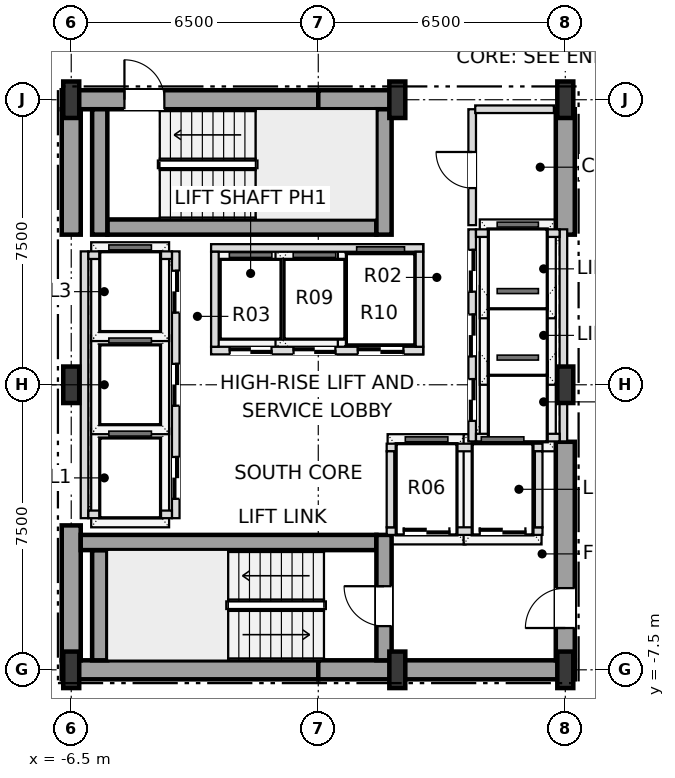
"""IFC4 building model, lengths in metres.
Left out: names, types, materials, properties, quantities, classifications, styles, units other than length and angle.
Written with IfcOpenShell. Run it as: python <this file> out.ifc"""

import sys

from ifc_helpers import new_model, si_unit, direction, frame, frame_2d, origin, origin_2d, place, context, subcontext, project, spatial, rectangle, i_section, extrude, element, fill, save


model = new_model("IFC4")
c1 = context("Model", 3, precision=1e-05, world=origin(), true_north=direction((0.0, 1.0)))
c2 = subcontext(c1, "Body", "Model", "MODEL_VIEW")
j1 = project(units=[si_unit("LENGTHUNIT", "METRE"), si_unit("PLANEANGLEUNIT", "RADIAN")], contexts=[c1])
p1 = place(None, origin())
s1 = spatial("IfcSite", under=j1, at=p1, CompositionType="ELEMENT")
p2 = place(p1, origin())
s2 = spatial("IfcBuilding", under=s1, at=p2, CompositionType="ELEMENT")
p3 = place(p2, frame((0.0, 0.0, -3.6)))
s3 = spatial("IfcBuildingStorey", under=s2, at=p3, CompositionType="ELEMENT", Elevation=-3.6)
for number, where, z_axis, x_axis in (
    (1, (-6.5, -7.5, 0.0), (0.0, 0.0, 1.0), (1.0, 0.0, 0.0)),
    (2, (2.08, -7.5, 0.0), (0.0, 0.0, 1.0), (1.0, 0.0, 0.0)),
    (3, (6.5, -7.5, 0.0), (0.0, 0.0, 1.0), (1.0, 0.0, 0.0)),
    (4, (-6.5, 0.0, 0.0), (0.0, 0.0, 1.0), (1.0, 0.0, 0.0)),
    (5, (6.5, 0.0, 0.0), (0.0, 0.0, 1.0), (1.0, 0.0, 0.0)),
    (6, (-6.5, 7.5, 0.0), (0.0, 0.0, 1.0), (1.0, 0.0, 0.0)),
    (7, (2.08, 7.5, 0.0), (0.0, 0.0, 1.0), (1.0, 0.0, 0.0)),
    (8, (6.5, 7.5, 0.0), (0.0, 0.0, 1.0), (1.0, 0.0, 0.0)),
):
    element("IfcColumn", number, at=place(p3, frame(where, z_axis=z_axis, x_axis=x_axis)), inside=s3, PredefinedType="COLUMN", context=c2, shape_type="SweptSolid", body=[
        extrude(i_section(OverallWidth=0.42, OverallDepth=0.96, WebThickness=0.022, FlangeThickness=0.034, at=origin_2d()), origin(), (0.0, 0.0, 1.0), 3.6),
    ])
for number, where, z_axis, x_axis in (
    (9, (-6.75, -7.5, 0.0), (0.0, 0.0, 1.0), (1.0, 0.0, 0.0)),
    (10, (0.0, -7.5, 0.0), (0.0, 0.0, 1.0), (1.0, 0.0, 0.0)),
):
    element("IfcWall", number, at=place(p3, frame(where, z_axis=z_axis, x_axis=x_axis)), inside=s3, PredefinedType="SHEAR", context=c2, shape_type="SweptSolid", body=[
        extrude(rectangle(XDim=6.75, YDim=0.5, at=frame_2d((3.375, 0.0))), origin(), (0.0, 0.0, 1.0), 3.25),
    ])
p4 = place(p3, frame((-6.75, 7.5, 0.0), z_axis=(0.0, 0.0, 1.0), x_axis=(1.0, 0.0, 0.0)))
e11 = element("IfcWall", 11, at=p4, inside=s3, PredefinedType="SHEAR", context=c2, shape_type="SweptSolid", body=[
    extrude(rectangle(XDim=6.75, YDim=0.5, at=frame_2d((3.375, 0.0))), origin(), (0.0, 0.0, 1.0), 3.25),
])
p5 = place(p4, frame((1.65, 0.0, 0.0)))
e12 = element("IfcOpeningElement", 12, at=p5, cuts=e11, PredefinedType="OPENING", context=c2, shape_type="SweptSolid", body=[
    extrude(rectangle(XDim=1.05, YDim=2.15, at=frame_2d((0.525, 1.075))), frame((0.0, 0.26, 0.0), z_axis=(0.0, -1.0, 0.0), x_axis=(1.0, 0.0, 0.0)), (0.0, 0.0, 1.0), 0.52),
])
p6 = place(p3, frame((0.0, 7.5, 0.0), z_axis=(0.0, 0.0, 1.0), x_axis=(1.0, 0.0, 0.0)))
e13 = element("IfcWall", 13, at=p6, inside=s3, PredefinedType="SHEAR", context=c2, shape_type="SweptSolid", body=[
    extrude(rectangle(XDim=2.08, YDim=0.5, at=frame_2d((1.04, 0.0))), origin(), (0.0, 0.0, 1.0), 3.25),
])
p7 = place(p3, frame((-6.5, -7.25, 0.0), z_axis=(0.0, 0.0, 1.0), x_axis=(0.0, 1.0, 0.0)))
e14 = element("IfcWall", 14, at=p7, inside=s3, PredefinedType="SHEAR", context=c2, shape_type="SweptSolid", body=[
    extrude(rectangle(XDim=3.55, YDim=0.5, at=frame_2d((1.775, 0.0))), origin(), (0.0, 0.0, 1.0), 3.25),
])
p8 = place(p3, frame((-6.5, 3.95, 0.0), z_axis=(0.0, 0.0, 1.0), x_axis=(0.0, 1.0, 0.0)))
e15 = element("IfcWall", 15, at=p8, inside=s3, PredefinedType="SHEAR", context=c2, shape_type="SweptSolid", body=[
    extrude(rectangle(XDim=3.3, YDim=0.5, at=frame_2d((1.65, 0.0))), origin(), (0.0, 0.0, 1.0), 3.25),
])
p9 = place(p3, frame((6.5, -7.25, 0.0), z_axis=(0.0, 0.0, 1.0), x_axis=(0.0, 1.0, 0.0)))
e16 = element("IfcWall", 16, at=p9, inside=s3, PredefinedType="SHEAR", context=c2, shape_type="SweptSolid", body=[
    extrude(rectangle(XDim=5.75, YDim=0.5, at=frame_2d((2.875, 0.0))), origin(), (0.0, 0.0, 1.0), 3.25),
])
p10 = place(p9, frame((0.85, 0.0, 0.0)))
e17 = element("IfcOpeningElement", 17, at=p10, cuts=e16, PredefinedType="OPENING", context=c2, shape_type="SweptSolid", body=[
    extrude(rectangle(XDim=1.05, YDim=2.15, at=frame_2d((0.525, 1.075))), frame((0.0, 0.26, 0.0), z_axis=(0.0, -1.0, 0.0), x_axis=(1.0, 0.0, 0.0)), (0.0, 0.0, 1.0), 0.52),
])
p11 = place(p3, frame((6.5, 3.95, 0.0), z_axis=(0.0, 0.0, 1.0), x_axis=(0.0, 1.0, 0.0)))
e18 = element("IfcWall", 18, at=p11, inside=s3, PredefinedType="SHEAR", context=c2, shape_type="SweptSolid", body=[
    extrude(rectangle(XDim=3.3, YDim=0.5, at=frame_2d((1.65, 0.0))), origin(), (0.0, 0.0, 1.0), 3.25),
])
p12 = place(p3, frame((-5.75, -7.25, 0.0), z_axis=(0.0, 0.0, 1.0), x_axis=(0.0, 1.0, 0.0)))
e19 = element("IfcWall", 19, at=p12, inside=s3, PredefinedType="SHEAR", context=c2, shape_type="SweptSolid", body=[
    extrude(rectangle(XDim=2.9, YDim=0.4, at=frame_2d((1.45, 0.0))), origin(), (0.0, 0.0, 1.0), 3.25),
])
p13 = place(p3, frame((-6.25, -4.15, 0.0), z_axis=(0.0, 0.0, 1.0), x_axis=(1.0, 0.0, 0.0)))
e20 = element("IfcWall", 20, at=p13, inside=s3, PredefinedType="SHEAR", context=c2, shape_type="SweptSolid", body=[
    extrude(rectangle(XDim=7.78, YDim=0.4, at=frame_2d((3.89, 0.0))), origin(), (0.0, 0.0, 1.0), 3.25),
])
p14 = place(p3, frame((1.73, -7.25, 0.0), z_axis=(0.0, 0.0, 1.0), x_axis=(0.0, 1.0, 0.0)))
e21 = element("IfcWall", 21, at=p14, inside=s3, PredefinedType="SHEAR", context=c2, shape_type="SweptSolid", body=[
    extrude(rectangle(XDim=3.3, YDim=0.4, at=frame_2d((1.65, 0.0))), origin(), (0.0, 0.0, 1.0), 3.25),
])
p15 = place(p14, frame((0.9, 0.0, 0.0)))
e22 = element("IfcOpeningElement", 22, at=p15, cuts=e21, PredefinedType="OPENING", context=c2, shape_type="SweptSolid", body=[
    extrude(rectangle(XDim=1.05, YDim=2.15, at=frame_2d((0.525, 1.075))), frame((0.0, 0.21, 0.0), z_axis=(0.0, -1.0, 0.0), x_axis=(1.0, 0.0, 0.0)), (0.0, 0.0, 1.0), 0.42),
])
p16 = place(p3, frame((-5.55, 4.15, 0.0), z_axis=(0.0, 0.0, 1.0), x_axis=(1.0, 0.0, 0.0)))
e23 = element("IfcWall", 23, at=p16, inside=s3, PredefinedType="SHEAR", context=c2, shape_type="SweptSolid", body=[
    extrude(rectangle(XDim=7.08, YDim=0.4, at=frame_2d((3.54, 0.0))), origin(), (0.0, 0.0, 1.0), 3.25),
])
for number, where, z_axis, x_axis in (
    (24, (1.73, 3.95, 0.0), (0.0, 0.0, 1.0), (0.0, 1.0, 0.0)),
    (25, (-5.75, 3.95, 0.0), (0.0, 0.0, 1.0), (0.0, 1.0, 0.0)),
):
    element("IfcWall", number, at=place(p3, frame(where, z_axis=z_axis, x_axis=x_axis)), inside=s3, PredefinedType="SHEAR", context=c2, shape_type="SweptSolid", body=[
        extrude(rectangle(XDim=3.3, YDim=0.4, at=frame_2d((1.65, 0.0))), origin(), (0.0, 0.0, 1.0), 3.25),
    ])
p17 = place(p3, frame((-3.75, -3.51, 0.0), z_axis=(0.0, 0.0, 1.0), x_axis=(0.0, 1.0, 0.0)))
e26 = element("IfcWall", 26, at=p17, inside=s3, PredefinedType="SOLIDWALL", context=c2, shape_type="SweptSolid", body=[
    extrude(rectangle(XDim=7.02, YDim=0.2, at=frame_2d((3.51, 0.0))), origin(), (0.0, 0.0, 1.0), 3.25),
])
p18 = place(p17, frame((0.51, 0.0, 0.0)))
e27 = element("IfcOpeningElement", 27, at=p18, cuts=e26, PredefinedType="OPENING", context=c2, shape_type="SweptSolid", body=[
    extrude(rectangle(XDim=1.1, YDim=2.15, at=frame_2d((0.55, 1.075))), frame((0.0, 0.11, 0.0), z_axis=(0.0, -1.0, 0.0), x_axis=(1.0, 0.0, 0.0)), (0.0, 0.0, 1.0), 0.22),
])
p19 = place(p17, frame((2.96, 0.0, 0.0)))
e28 = element("IfcOpeningElement", 28, at=p19, cuts=e26, PredefinedType="OPENING", context=c2, shape_type="SweptSolid", body=[
    extrude(rectangle(XDim=1.1, YDim=2.15, at=frame_2d((0.55, 1.075))), frame((0.0, 0.11, 0.0), z_axis=(0.0, -1.0, 0.0), x_axis=(1.0, 0.0, 0.0)), (0.0, 0.0, 1.0), 0.22),
])
p20 = place(p17, frame((5.41, 0.0, 0.0)))
e29 = element("IfcOpeningElement", 29, at=p20, cuts=e26, PredefinedType="OPENING", context=c2, shape_type="SweptSolid", body=[
    extrude(rectangle(XDim=1.1, YDim=2.15, at=frame_2d((0.55, 1.075))), frame((0.0, 0.11, 0.0), z_axis=(0.0, -1.0, 0.0), x_axis=(1.0, 0.0, 0.0)), (0.0, 0.0, 1.0), 0.22),
])
p21 = place(p3, frame((-6.15, -3.51, 0.0), z_axis=(0.0, 0.0, 1.0), x_axis=(0.0, 1.0, 0.0)))
e30 = element("IfcWall", 30, at=p21, inside=s3, PredefinedType="SOLIDWALL", context=c2, shape_type="SweptSolid", body=[
    extrude(rectangle(XDim=7.02, YDim=0.2, at=frame_2d((3.51, 0.0))), origin(), (0.0, 0.0, 1.0), 2.335),
])
for number, where, z_axis, x_axis in (
    (31, (-6.05, -3.41, 0.0), (0.0, 0.0, 1.0), (1.0, 0.0, 0.0)),
    (32, (-6.05, 3.41, 0.0), (0.0, 0.0, 1.0), (1.0, 0.0, 0.0)),
):
    element("IfcWall", number, at=place(p3, frame(where, z_axis=z_axis, x_axis=x_axis)), inside=s3, PredefinedType="SOLIDWALL", context=c2, shape_type="SweptSolid", body=[
        extrude(rectangle(XDim=2.2, YDim=0.2, at=frame_2d((1.1, 0.0))), origin(), (0.0, 0.0, 1.0), 3.25),
    ])
p22 = place(p3, frame((4.05, -1.49, 0.0), z_axis=(0.0, 0.0, 1.0), x_axis=(0.0, 1.0, 0.0)))
e33 = element("IfcWall", 33, at=p22, inside=s3, PredefinedType="SOLIDWALL", context=c2, shape_type="SweptSolid", body=[
    extrude(rectangle(XDim=5.58, YDim=0.2, at=frame_2d((2.79, 0.0))), origin(), (0.0, 0.0, 1.0), 3.25),
])
p23 = place(p22, frame((0.54, 0.0, 0.0)))
e34 = element("IfcOpeningElement", 34, at=p23, cuts=e33, PredefinedType="OPENING", context=c2, shape_type="SweptSolid", body=[
    extrude(rectangle(XDim=1.1, YDim=2.15, at=frame_2d((0.55, 1.075))), frame((0.0, 0.11, 0.0), z_axis=(0.0, -1.0, 0.0), x_axis=(1.0, 0.0, 0.0)), (0.0, 0.0, 1.0), 0.22),
])
p24 = place(p22, frame((2.24, 0.0, 0.0)))
e35 = element("IfcOpeningElement", 35, at=p24, cuts=e33, PredefinedType="OPENING", context=c2, shape_type="SweptSolid", body=[
    extrude(rectangle(XDim=1.1, YDim=2.15, at=frame_2d((0.55, 1.075))), frame((0.0, 0.11, 0.0), z_axis=(0.0, -1.0, 0.0), x_axis=(1.0, 0.0, 0.0)), (0.0, 0.0, 1.0), 0.22),
])
p25 = place(p22, frame((3.94, 0.0, 0.0)))
e36 = element("IfcOpeningElement", 36, at=p25, cuts=e33, PredefinedType="OPENING", context=c2, shape_type="SweptSolid", body=[
    extrude(rectangle(XDim=1.1, YDim=2.15, at=frame_2d((0.55, 1.075))), frame((0.0, 0.11, 0.0), z_axis=(0.0, -1.0, 0.0), x_axis=(1.0, 0.0, 0.0)), (0.0, 0.0, 1.0), 0.22),
])
p26 = place(p3, frame((6.45, -1.49, 0.0), z_axis=(0.0, 0.0, 1.0), x_axis=(0.0, 1.0, 0.0)))
e37 = element("IfcWall", 37, at=p26, inside=s3, PredefinedType="SOLIDWALL", context=c2, shape_type="SweptSolid", body=[
    extrude(rectangle(XDim=5.58, YDim=0.2, at=frame_2d((2.79, 0.0))), origin(), (0.0, 0.0, 1.0), 2.335),
])
for number, where, z_axis, x_axis in (
    (38, (4.15, -1.39, 0.0), (0.0, 0.0, 1.0), (1.0, 0.0, 0.0)),
    (39, (4.15, 3.99, 0.0), (0.0, 0.0, 1.0), (1.0, 0.0, 0.0)),
):
    element("IfcWall", number, at=place(p3, frame(where, z_axis=z_axis, x_axis=x_axis)), inside=s3, PredefinedType="SOLIDWALL", context=c2, shape_type="SweptSolid", body=[
        extrude(rectangle(XDim=2.2, YDim=0.2, at=frame_2d((1.1, 0.0))), origin(), (0.0, 0.0, 1.0), 2.335),
    ])
p27 = place(p3, frame((-2.82, 0.9, 0.0), z_axis=(0.0, 0.0, 1.0), x_axis=(1.0, 0.0, 0.0)))
e40 = element("IfcWall", 40, at=p27, inside=s3, PredefinedType="SOLIDWALL", context=c2, shape_type="SweptSolid", body=[
    extrude(rectangle(XDim=5.58, YDim=0.2, at=frame_2d((2.79, 0.0))), origin(), (0.0, 0.0, 1.0), 3.25),
])
p28 = place(p27, frame((0.49, 0.0, 0.0)))
e41 = element("IfcOpeningElement", 41, at=p28, cuts=e40, PredefinedType="OPENING", context=c2, shape_type="SweptSolid", body=[
    extrude(rectangle(XDim=1.1, YDim=2.15, at=frame_2d((0.55, 1.075))), frame((0.0, 0.11, 0.0), z_axis=(0.0, -1.0, 0.0), x_axis=(1.0, 0.0, 0.0)), (0.0, 0.0, 1.0), 0.22),
])
p29 = place(p27, frame((2.17, 0.0, 0.0)))
e42 = element("IfcOpeningElement", 42, at=p29, cuts=e40, PredefinedType="OPENING", context=c2, shape_type="SweptSolid", body=[
    extrude(rectangle(XDim=1.1, YDim=2.15, at=frame_2d((0.55, 1.075))), frame((0.0, 0.11, 0.0), z_axis=(0.0, -1.0, 0.0), x_axis=(1.0, 0.0, 0.0)), (0.0, 0.0, 1.0), 0.22),
])
p30 = place(p27, frame((3.86, 0.0, 0.0)))
e43 = element("IfcOpeningElement", 43, at=p30, cuts=e40, PredefinedType="OPENING", context=c2, shape_type="SweptSolid", body=[
    extrude(rectangle(XDim=1.2, YDim=2.2, at=frame_2d((0.6, 1.1))), frame((0.0, 0.11, 0.0), z_axis=(0.0, -1.0, 0.0), x_axis=(1.0, 0.0, 0.0)), (0.0, 0.0, 1.0), 0.22),
])
p31 = place(p3, frame((-2.82, 3.6, 0.0), z_axis=(0.0, 0.0, 1.0), x_axis=(1.0, 0.0, 0.0)))
e44 = element("IfcWall", 44, at=p31, inside=s3, PredefinedType="SOLIDWALL", context=c2, shape_type="SweptSolid", body=[
    extrude(rectangle(XDim=5.58, YDim=0.2, at=frame_2d((2.79, 0.0))), origin(), (0.0, 0.0, 1.0), 3.25),
])
for number, where, z_axis, x_axis in (
    (45, (-2.72, 1.0, 0.0), (0.0, 0.0, 1.0), (0.0, 1.0, 0.0)),
    (46, (2.66, 1.0, 0.0), (0.0, 0.0, 1.0), (0.0, 1.0, 0.0)),
):
    element("IfcWall", number, at=place(p3, frame(where, z_axis=z_axis, x_axis=x_axis)), inside=s3, PredefinedType="SOLIDWALL", context=c2, shape_type="SweptSolid", body=[
        extrude(rectangle(XDim=2.5, YDim=0.2, at=frame_2d((1.25, 0.0))), origin(), (0.0, 0.0, 1.0), 3.25),
    ])
p32 = place(p3, frame((1.8, -3.85, 0.0), z_axis=(0.0, 0.0, 1.0), x_axis=(1.0, 0.0, 0.0)))
e47 = element("IfcWall", 47, at=p32, inside=s3, PredefinedType="SOLIDWALL", context=c2, shape_type="SweptSolid", body=[
    extrude(rectangle(XDim=4.1, YDim=0.2, at=frame_2d((2.05, 0.0))), origin(), (0.0, 0.0, 1.0), 3.25),
])
p33 = place(p32, frame((0.45, 0.0, 0.0)))
e48 = element("IfcOpeningElement", 48, at=p33, cuts=e47, PredefinedType="OPENING", context=c2, shape_type="SweptSolid", body=[
    extrude(rectangle(XDim=1.2, YDim=2.2, at=frame_2d((0.6, 1.1))), frame((0.0, 0.11, 0.0), z_axis=(0.0, -1.0, 0.0), x_axis=(1.0, 0.0, 0.0)), (0.0, 0.0, 1.0), 0.22),
])
p34 = place(p32, frame((2.45, 0.0, 0.0)))
e49 = element("IfcOpeningElement", 49, at=p34, cuts=e47, PredefinedType="OPENING", context=c2, shape_type="SweptSolid", body=[
    extrude(rectangle(XDim=1.2, YDim=2.2, at=frame_2d((0.6, 1.1))), frame((0.0, 0.11, 0.0), z_axis=(0.0, -1.0, 0.0), x_axis=(1.0, 0.0, 0.0)), (0.0, 0.0, 1.0), 0.22),
])
p35 = place(p3, frame((1.8, -1.65, 0.0), z_axis=(0.0, 0.0, 1.0), x_axis=(1.0, 0.0, 0.0)))
e50 = element("IfcWall", 50, at=p35, inside=s3, PredefinedType="SOLIDWALL", context=c2, shape_type="SweptSolid", body=[
    extrude(rectangle(XDim=4.1, YDim=0.2, at=frame_2d((2.05, 0.0))), origin(), (0.0, 0.0, 1.0), 3.25),
])
for number, where, z_axis, x_axis in (
    (51, (1.9, -3.75, 0.0), (0.0, 0.0, 1.0), (0.0, 1.0, 0.0)),
    (52, (5.8, -3.75, 0.0), (0.0, 0.0, 1.0), (0.0, 1.0, 0.0)),
):
    element("IfcWall", number, at=place(p3, frame(where, z_axis=z_axis, x_axis=x_axis)), inside=s3, PredefinedType="SOLIDWALL", context=c2, shape_type="SweptSolid", body=[
        extrude(rectangle(XDim=2.0, YDim=0.2, at=frame_2d((1.0, 0.0))), origin(), (0.0, 0.0, 1.0), 3.25),
    ])
p36 = place(p3, frame((4.05, 4.2, 0.0), z_axis=(0.0, 0.0, 1.0), x_axis=(0.0, 1.0, 0.0)))
e53 = element("IfcWall", 53, at=p36, inside=s3, PredefinedType="SOLIDWALL", context=c2, shape_type="SweptSolid", body=[
    extrude(rectangle(XDim=3.05, YDim=0.2, at=frame_2d((1.525, 0.0))), origin(), (0.0, 0.0, 1.0), 3.25),
])
p37 = place(p36, frame((0.975, 0.0, 0.0)))
e54 = element("IfcOpeningElement", 54, at=p37, cuts=e53, PredefinedType="OPENING", context=c2, shape_type="SweptSolid", body=[
    extrude(rectangle(XDim=0.95, YDim=2.15, at=frame_2d((0.475, 1.075))), frame((0.0, 0.11, 0.0), z_axis=(0.0, -1.0, 0.0), x_axis=(1.0, 0.0, 0.0)), (0.0, 0.0, 1.0), 0.22),
])
p38 = place(p3, frame((4.13, 7.25, 0.0), z_axis=(0.0, 0.0, 1.0), x_axis=(1.0, 0.0, 0.0)))
e55 = element("IfcWall", 55, at=p38, inside=s3, PredefinedType="SOLIDWALL", context=c2, shape_type="SweptSolid", body=[
    extrude(rectangle(XDim=2.07, YDim=0.2, at=frame_2d((1.035, 0.0))), origin(), (0.0, 0.0, 1.0), 2.335),
])
p39 = place(p10, origin())
e56 = element("IfcDoor", 56, at=p39, inside=s3, OperationType="SINGLE_SWING_LEFT", PredefinedType="DOOR", context=c2, shape_type="SweptSolid", body=[
    extrude(rectangle(XDim=1.05, YDim=2.15, at=frame_2d((0.525, 1.075))), frame((0.0, 0.025, 0.0), z_axis=(0.0, -1.0, 0.0), x_axis=(1.0, 0.0, 0.0)), (0.0, 0.0, 1.0), 0.05),
])
fill(e17, e56)
p40 = place(p15, origin())
e57 = element("IfcDoor", 57, at=p40, inside=s3, OperationType="SINGLE_SWING_RIGHT", PredefinedType="DOOR", context=c2, shape_type="SweptSolid", body=[
    extrude(rectangle(XDim=1.05, YDim=2.15, at=frame_2d((0.525, 1.075))), frame((0.0, 0.025, 0.0), z_axis=(0.0, -1.0, 0.0), x_axis=(1.0, 0.0, 0.0)), (0.0, 0.0, 1.0), 0.05),
])
fill(e22, e57)
p41 = place(p5, origin())
e58 = element("IfcDoor", 58, at=p41, inside=s3, OperationType="SINGLE_SWING_LEFT", PredefinedType="DOOR", context=c2, shape_type="SweptSolid", body=[
    extrude(rectangle(XDim=1.05, YDim=2.15, at=frame_2d((0.525, 1.075))), frame((0.0, 0.025, 0.0), z_axis=(0.0, -1.0, 0.0), x_axis=(1.0, 0.0, 0.0)), (0.0, 0.0, 1.0), 0.05),
])
fill(e12, e58)
p42 = place(p18, origin())
e59 = element("IfcDoor", 59, at=p42, inside=s3, OperationType="DOUBLE_DOOR_SLIDING", PredefinedType="DOOR", context=c2, shape_type="SweptSolid", body=[
    extrude(rectangle(XDim=1.1, YDim=2.15, at=frame_2d((0.55, 1.075))), frame((0.0, 0.025, 0.0), z_axis=(0.0, -1.0, 0.0), x_axis=(1.0, 0.0, 0.0)), (0.0, 0.0, 1.0), 0.05),
])
fill(e27, e59)
p43 = place(p19, origin())
e60 = element("IfcDoor", 60, at=p43, inside=s3, OperationType="DOUBLE_DOOR_SLIDING", PredefinedType="DOOR", context=c2, shape_type="SweptSolid", body=[
    extrude(rectangle(XDim=1.1, YDim=2.15, at=frame_2d((0.55, 1.075))), frame((0.0, 0.025, 0.0), z_axis=(0.0, -1.0, 0.0), x_axis=(1.0, 0.0, 0.0)), (0.0, 0.0, 1.0), 0.05),
])
fill(e28, e60)
p44 = place(p20, origin())
e61 = element("IfcDoor", 61, at=p44, inside=s3, OperationType="DOUBLE_DOOR_SLIDING", PredefinedType="DOOR", context=c2, shape_type="SweptSolid", body=[
    extrude(rectangle(XDim=1.1, YDim=2.15, at=frame_2d((0.55, 1.075))), frame((0.0, 0.025, 0.0), z_axis=(0.0, -1.0, 0.0), x_axis=(1.0, 0.0, 0.0)), (0.0, 0.0, 1.0), 0.05),
])
fill(e29, e61)
p45 = place(p23, origin())
e62 = element("IfcDoor", 62, at=p45, inside=s3, OperationType="DOUBLE_DOOR_SLIDING", PredefinedType="DOOR", context=c2, shape_type="SweptSolid", body=[
    extrude(rectangle(XDim=1.1, YDim=2.15, at=frame_2d((0.55, 1.075))), frame((0.0, 0.025, 0.0), z_axis=(0.0, -1.0, 0.0), x_axis=(1.0, 0.0, 0.0)), (0.0, 0.0, 1.0), 0.05),
])
fill(e34, e62)
p46 = place(p24, origin())
e63 = element("IfcDoor", 63, at=p46, inside=s3, OperationType="DOUBLE_DOOR_SLIDING", PredefinedType="DOOR", context=c2, shape_type="SweptSolid", body=[
    extrude(rectangle(XDim=1.1, YDim=2.15, at=frame_2d((0.55, 1.075))), frame((0.0, 0.025, 0.0), z_axis=(0.0, -1.0, 0.0), x_axis=(1.0, 0.0, 0.0)), (0.0, 0.0, 1.0), 0.05),
])
fill(e35, e63)
p47 = place(p25, origin())
e64 = element("IfcDoor", 64, at=p47, inside=s3, OperationType="DOUBLE_DOOR_SLIDING", PredefinedType="DOOR", context=c2, shape_type="SweptSolid", body=[
    extrude(rectangle(XDim=1.1, YDim=2.15, at=frame_2d((0.55, 1.075))), frame((0.0, 0.025, 0.0), z_axis=(0.0, -1.0, 0.0), x_axis=(1.0, 0.0, 0.0)), (0.0, 0.0, 1.0), 0.05),
])
fill(e36, e64)
p48 = place(p28, origin())
e65 = element("IfcDoor", 65, at=p48, inside=s3, OperationType="DOUBLE_DOOR_SLIDING", PredefinedType="DOOR", context=c2, shape_type="SweptSolid", body=[
    extrude(rectangle(XDim=1.1, YDim=2.15, at=frame_2d((0.55, 1.075))), frame((0.0, 0.025, 0.0), z_axis=(0.0, -1.0, 0.0), x_axis=(1.0, 0.0, 0.0)), (0.0, 0.0, 1.0), 0.05),
])
fill(e41, e65)
p49 = place(p29, origin())
e66 = element("IfcDoor", 66, at=p49, inside=s3, OperationType="DOUBLE_DOOR_SLIDING", PredefinedType="DOOR", context=c2, shape_type="SweptSolid", body=[
    extrude(rectangle(XDim=1.1, YDim=2.15, at=frame_2d((0.55, 1.075))), frame((0.0, 0.025, 0.0), z_axis=(0.0, -1.0, 0.0), x_axis=(1.0, 0.0, 0.0)), (0.0, 0.0, 1.0), 0.05),
])
fill(e42, e66)
p50 = place(p30, origin())
e67 = element("IfcDoor", 67, at=p50, inside=s3, OperationType="DOUBLE_DOOR_SLIDING", PredefinedType="DOOR", context=c2, shape_type="SweptSolid", body=[
    extrude(rectangle(XDim=1.2, YDim=2.2, at=frame_2d((0.6, 1.1))), frame((0.0, 0.025, 0.0), z_axis=(0.0, -1.0, 0.0), x_axis=(1.0, 0.0, 0.0)), (0.0, 0.0, 1.0), 0.05),
])
fill(e43, e67)
p51 = place(p33, origin())
e68 = element("IfcDoor", 68, at=p51, inside=s3, OperationType="DOUBLE_DOOR_SLIDING", PredefinedType="DOOR", context=c2, shape_type="SweptSolid", body=[
    extrude(rectangle(XDim=1.2, YDim=2.2, at=frame_2d((0.6, 1.1))), frame((0.0, 0.025, 0.0), z_axis=(0.0, -1.0, 0.0), x_axis=(1.0, 0.0, 0.0)), (0.0, 0.0, 1.0), 0.05),
])
fill(e48, e68)
p52 = place(p34, origin())
e69 = element("IfcDoor", 69, at=p52, inside=s3, OperationType="DOUBLE_DOOR_SLIDING", PredefinedType="DOOR", context=c2, shape_type="SweptSolid", body=[
    extrude(rectangle(XDim=1.2, YDim=2.2, at=frame_2d((0.6, 1.1))), frame((0.0, 0.025, 0.0), z_axis=(0.0, -1.0, 0.0), x_axis=(1.0, 0.0, 0.0)), (0.0, 0.0, 1.0), 0.05),
])
fill(e49, e69)
p53 = place(p37, origin())
e70 = element("IfcDoor", 70, at=p53, inside=s3, OperationType="SINGLE_SWING_RIGHT", PredefinedType="DOOR", context=c2, shape_type="SweptSolid", body=[
    extrude(rectangle(XDim=0.95, YDim=2.15, at=frame_2d((0.475, 1.075))), frame((0.0, 0.025, 0.0), z_axis=(0.0, -1.0, 0.0), x_axis=(1.0, 0.0, 0.0)), (0.0, 0.0, 1.0), 0.05),
])
fill(e54, e70)
save(model, sys.argv[1])
